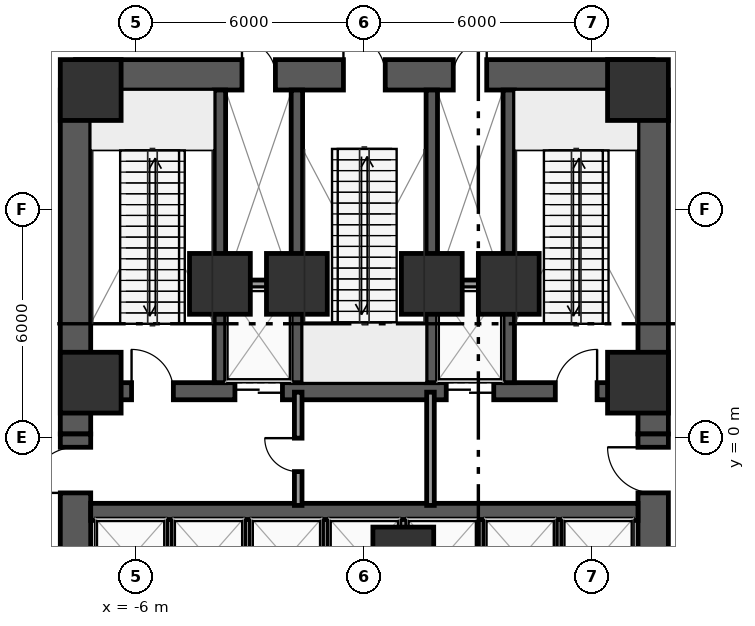
"""IFC4 building model, lengths in metres.
Left out: names, types, materials, properties, quantities, classifications, styles, units other than length and angle.
Written with IfcOpenShell. Run it as: python <this file> out.ifc"""

import sys

from ifc_helpers import new_model, si_unit, direction, frame, frame_2d, origin, origin_2d, place, context, subcontext, project, spatial, rectangle, extrude, element, fill, save


model = new_model("IFC4")
c1 = context("Model", 3, precision=1e-05, world=origin(), true_north=direction((0.0, 1.0)))
c2 = subcontext(c1, "Body", "Model", "MODEL_VIEW")
j1 = project(units=[si_unit("LENGTHUNIT", "METRE"), si_unit("PLANEANGLEUNIT", "RADIAN")], contexts=[c1])
p1 = place(None, origin())
s1 = spatial("IfcSite", under=j1, at=p1, CompositionType="ELEMENT")
p2 = place(p1, origin())
s2 = spatial("IfcBuilding", under=s1, at=p2, CompositionType="ELEMENT")
p3 = place(p2, origin())
s3 = spatial("IfcBuildingStorey", under=s2, at=p3, CompositionType="ELEMENT", Elevation=0.0)
p4 = place(p3, frame((-7.6, 9.55, 0.0), z_axis=(0.0, 0.0, 1.0), x_axis=(1.0, 0.0, 0.0)))
e1 = element("IfcWall", 1, at=p4, inside=s3, PredefinedType="SHEAR", context=c2, shape_type="SweptSolid", body=[
    extrude(rectangle(XDim=15.2, YDim=0.8, at=frame_2d((7.6, 0.0))), origin(), (0.0, 0.0, 1.0), 5.7),
])
p5 = place(p4, frame((7.05, 0.0, 0.0)))
e2 = element("IfcOpeningElement", 2, at=p5, cuts=e1, PredefinedType="OPENING", context=c2, shape_type="SweptSolid", body=[
    extrude(rectangle(XDim=1.1, YDim=2.15, at=frame_2d((0.55, 1.075))), frame((0.0, 0.41, 0.0), z_axis=(0.0, -1.0, 0.0), x_axis=(1.0, 0.0, 0.0)), (0.0, 0.0, 1.0), 0.82),
])
p6 = place(p4, frame((4.38, 0.0, 0.0)))
e3 = element("IfcOpeningElement", 3, at=p6, cuts=e1, PredefinedType="OPENING", context=c2, shape_type="SweptSolid", body=[
    extrude(rectangle(XDim=0.88, YDim=2.15, at=frame_2d((0.44, 1.075))), frame((0.0, 0.41, 0.0), z_axis=(0.0, -1.0, 0.0), x_axis=(1.0, 0.0, 0.0)), (0.0, 0.0, 1.0), 0.82),
])
p7 = place(p4, frame((9.94, 0.0, 0.0)))
e4 = element("IfcOpeningElement", 4, at=p7, cuts=e1, PredefinedType="OPENING", context=c2, shape_type="SweptSolid", body=[
    extrude(rectangle(XDim=0.88, YDim=2.15, at=frame_2d((0.44, 1.075))), frame((0.0, 0.41, 0.0), z_axis=(0.0, -1.0, 0.0), x_axis=(1.0, 0.0, 0.0)), (0.0, 0.0, 1.0), 0.82),
])
p8 = place(p3, frame((-7.2, 1.225, 0.0), z_axis=(0.0, 0.0, 1.0), x_axis=(1.0, 0.0, 0.0)))
e5 = element("IfcWall", 5, at=p8, inside=s3, PredefinedType="SHEAR", context=c2, shape_type="SweptSolid", body=[
    extrude(rectangle(XDim=14.4, YDim=0.45, at=frame_2d((7.2, 0.0))), origin(), (0.0, 0.0, 1.0), 5.7),
])
p9 = place(p8, frame((3.795, 0.0, 0.0)))
e6 = element("IfcOpeningElement", 6, at=p9, cuts=e5, PredefinedType="OPENING", context=c2, shape_type="SweptSolid", body=[
    extrude(rectangle(XDim=1.25, YDim=2.25, at=frame_2d((0.625, 1.125))), frame((0.0, 0.235, 0.0), z_axis=(0.0, -1.0, 0.0), x_axis=(1.0, 0.0, 0.0)), (0.0, 0.0, 1.0), 0.47),
])
p10 = place(p8, frame((9.355, 0.0, 0.0)))
e7 = element("IfcOpeningElement", 7, at=p10, cuts=e5, PredefinedType="OPENING", context=c2, shape_type="SweptSolid", body=[
    extrude(rectangle(XDim=1.25, YDim=2.25, at=frame_2d((0.625, 1.125))), frame((0.0, 0.235, 0.0), z_axis=(0.0, -1.0, 0.0), x_axis=(1.0, 0.0, 0.0)), (0.0, 0.0, 1.0), 0.47),
])
p11 = place(p8, frame((1.075, 0.0, 0.0)))
e8 = element("IfcOpeningElement", 8, at=p11, cuts=e5, PredefinedType="OPENING", context=c2, shape_type="SweptSolid", body=[
    extrude(rectangle(XDim=1.1, YDim=2.15, at=frame_2d((0.55, 1.075))), frame((0.0, 0.235, 0.0), z_axis=(0.0, -1.0, 0.0), x_axis=(1.0, 0.0, 0.0)), (0.0, 0.0, 1.0), 0.47),
])
p12 = place(p8, frame((12.225, 0.0, 0.0)))
e9 = element("IfcOpeningElement", 9, at=p12, cuts=e5, PredefinedType="OPENING", context=c2, shape_type="SweptSolid", body=[
    extrude(rectangle(XDim=1.1, YDim=2.15, at=frame_2d((0.55, 1.075))), frame((0.0, 0.235, 0.0), z_axis=(0.0, -1.0, 0.0), x_axis=(1.0, 0.0, 0.0)), (0.0, 0.0, 1.0), 0.47),
])
for number, where, z_axis, x_axis in (
    (10, (-3.8, 1.45, 0.0), (0.0, 0.0, 1.0), (0.0, 1.0, 0.0)),
    (11, (-1.775, 1.45, 0.0), (0.0, 0.0, 1.0), (0.0, 1.0, 0.0)),
    (12, (1.775, 1.45, 0.0), (0.0, 0.0, 1.0), (0.0, 1.0, 0.0)),
    (13, (3.8, 1.45, 0.0), (0.0, 0.0, 1.0), (0.0, 1.0, 0.0)),
):
    element("IfcWall", number, at=place(p3, frame(where, z_axis=z_axis, x_axis=x_axis)), inside=s3, PredefinedType="SHEAR", context=c2, shape_type="SweptSolid", body=[
        extrude(rectangle(XDim=7.7, YDim=0.3, at=frame_2d((3.85, 0.0))), origin(), (0.0, 0.0, 1.0), 5.7),
    ])
for number, where, z_axis, x_axis in (
    (14, (-7.6, 0.1, 0.0), (0.0, 0.0, 1.0), (0.0, 1.0, 0.0)),
    (15, (7.6, 0.1, 0.0), (0.0, 0.0, 1.0), (0.0, 1.0, 0.0)),
):
    element("IfcWall", number, at=place(p3, frame(where, z_axis=z_axis, x_axis=x_axis)), inside=s3, PredefinedType="SHEAR", context=c2, shape_type="SweptSolid", body=[
        extrude(rectangle(XDim=9.05, YDim=0.8, at=frame_2d((4.525, 0.0))), origin(), (0.0, 0.0, 1.0), 5.7),
    ])
p13 = place(p3, frame((-7.6, -8.85, 0.0), z_axis=(0.0, 0.0, 1.0), x_axis=(0.0, 1.0, 0.0)))
e16 = element("IfcWall", 16, at=p13, inside=s3, PredefinedType="SHEAR", context=c2, shape_type="SweptSolid", body=[
    extrude(rectangle(XDim=8.95, YDim=0.8, at=frame_2d((4.475, 0.0))), origin(), (0.0, 0.0, 1.0), 5.7),
])
p14 = place(p13, frame((2.49, 0.0, 0.0)))
e17 = element("IfcOpeningElement", 17, at=p14, cuts=e16, PredefinedType="OPENING", context=c2, shape_type="SweptSolid", body=[
    extrude(rectangle(XDim=1.8, YDim=2.2, at=frame_2d((0.9, 1.1))), frame((0.0, 0.41, 0.0), z_axis=(0.0, -1.0, 0.0), x_axis=(1.0, 0.0, 0.0)), (0.0, 0.0, 1.0), 0.82),
])
p15 = place(p13, frame((7.4, 0.0, 0.0)))
e18 = element("IfcOpeningElement", 18, at=p15, cuts=e16, PredefinedType="OPENING", context=c2, shape_type="SweptSolid", body=[
    extrude(rectangle(XDim=1.2, YDim=2.15, at=frame_2d((0.6, 1.075))), frame((0.0, 0.41, 0.0), z_axis=(0.0, -1.0, 0.0), x_axis=(1.0, 0.0, 0.0)), (0.0, 0.0, 1.0), 0.82),
])
p16 = place(p3, frame((7.6, -8.85, 0.0), z_axis=(0.0, 0.0, 1.0), x_axis=(0.0, 1.0, 0.0)))
e19 = element("IfcWall", 19, at=p16, inside=s3, PredefinedType="SHEAR", context=c2, shape_type="SweptSolid", body=[
    extrude(rectangle(XDim=8.95, YDim=0.8, at=frame_2d((4.475, 0.0))), origin(), (0.0, 0.0, 1.0), 5.7),
])
p17 = place(p16, frame((2.49, 0.0, 0.0)))
e20 = element("IfcOpeningElement", 20, at=p17, cuts=e19, PredefinedType="OPENING", context=c2, shape_type="SweptSolid", body=[
    extrude(rectangle(XDim=1.8, YDim=2.2, at=frame_2d((0.9, 1.1))), frame((0.0, 0.41, 0.0), z_axis=(0.0, -1.0, 0.0), x_axis=(1.0, 0.0, 0.0)), (0.0, 0.0, 1.0), 0.82),
])
p18 = place(p16, frame((7.4, 0.0, 0.0)))
e21 = element("IfcOpeningElement", 21, at=p18, cuts=e19, PredefinedType="OPENING", context=c2, shape_type="SweptSolid", body=[
    extrude(rectangle(XDim=1.2, YDim=2.15, at=frame_2d((0.6, 1.075))), frame((0.0, 0.41, 0.0), z_axis=(0.0, -1.0, 0.0), x_axis=(1.0, 0.0, 0.0)), (0.0, 0.0, 1.0), 0.82),
])
p19 = place(p3, frame((-7.2, -1.95, 0.0), z_axis=(0.0, 0.0, 1.0), x_axis=(1.0, 0.0, 0.0)))
e22 = element("IfcWall", 22, at=p19, inside=s3, PredefinedType="SHEAR", context=c2, shape_type="SweptSolid", body=[
    extrude(rectangle(XDim=14.4, YDim=0.45, at=frame_2d((7.2, 0.0))), origin(), (0.0, 0.0, 1.0), 5.7),
])
for number, where, z_axis, x_axis in (
    (23, (7.2, 1.45, 0.0), (0.0, 0.0, 1.0), (1.0, 0.0, 0.0)),
    (24, (7.2, 9.15, 0.0), (0.0, 0.0, 1.0), (1.0, 0.0, 0.0)),
    (25, (-7.2, 9.15, 0.0), (0.0, 0.0, 1.0), (1.0, 0.0, 0.0)),
    (26, (-7.2, 1.45, 0.0), (0.0, 0.0, 1.0), (1.0, 0.0, 0.0)),
    (27, (-3.8, 4.05, 0.0), (0.0, 0.0, 1.0), (1.0, 0.0, 0.0)),
    (28, (3.8, 4.05, 0.0), (0.0, 0.0, 1.0), (1.0, 0.0, 0.0)),
    (29, (-1.775, 4.05, 0.0), (0.0, 0.0, 1.0), (1.0, 0.0, 0.0)),
    (30, (1.775, 4.05, 0.0), (0.0, 0.0, 1.0), (1.0, 0.0, 0.0)),
    (31, (1.025, -3.15, 0.0), (0.0, 0.0, 1.0), (1.0, 0.0, 0.0)),
):
    element("IfcColumn", number, at=place(p3, frame(where, z_axis=z_axis, x_axis=x_axis)), inside=s3, PredefinedType="COLUMN", context=c2, shape_type="SweptSolid", body=[
        extrude(rectangle(XDim=1.6, YDim=1.6, at=origin_2d()), origin(), (0.0, 0.0, 1.0), 6.0),
    ])
for number, where, z_axis, x_axis in (
    (32, (-3.65, 4.05, 0.0), (0.0, 0.0, 1.0), (1.0, 0.0, 0.0)),
    (33, (1.92, 4.05, 0.0), (0.0, 0.0, 1.0), (1.0, 0.0, 0.0)),
):
    element("IfcWall", number, at=place(p3, frame(where, z_axis=z_axis, x_axis=x_axis)), inside=s3, PredefinedType="PARTITIONING", context=c2, shape_type="SweptSolid", body=[
        extrude(rectangle(XDim=1.73, YDim=0.2, at=frame_2d((0.865, 0.0))), origin(), (0.0, 0.0, 1.0), 5.7),
    ])
for number, where, z_axis, x_axis in (
    (34, (-5.125, -4.18, 0.0), (0.0, 0.0, 1.0), (0.0, 1.0, 0.0)),
    (35, (-3.075, -4.18, 0.0), (0.0, 0.0, 1.0), (0.0, 1.0, 0.0)),
    (36, (-1.025, -4.18, 0.0), (0.0, 0.0, 1.0), (0.0, 1.0, 0.0)),
):
    element("IfcWall", number, at=place(p3, frame(where, z_axis=z_axis, x_axis=x_axis)), inside=s3, PredefinedType="PARTITIONING", context=c2, shape_type="SweptSolid", body=[
        extrude(rectangle(XDim=2.03, YDim=0.15, at=frame_2d((1.015, 0.0))), origin(), (0.0, 0.0, 1.0), 5.7),
    ])
p20 = place(p3, frame((1.025, -4.18, 0.0), z_axis=(0.0, 0.0, 1.0), x_axis=(0.0, 1.0, 0.0)))
e37 = element("IfcWall", 37, at=p20, inside=s3, PredefinedType="PARTITIONING", context=c2, shape_type="SweptSolid", body=[
    extrude(rectangle(XDim=2.03, YDim=0.18, at=frame_2d((1.015, 0.0))), origin(), (0.0, 0.0, 1.0), 4.748),
])
for number, where, z_axis, x_axis in (
    (38, (3.075, -4.18, 0.0), (0.0, 0.0, 1.0), (0.0, 1.0, 0.0)),
    (39, (5.125, -4.18, 0.0), (0.0, 0.0, 1.0), (0.0, 1.0, 0.0)),
):
    element("IfcWall", number, at=place(p3, frame(where, z_axis=z_axis, x_axis=x_axis)), inside=s3, PredefinedType="PARTITIONING", context=c2, shape_type="SweptSolid", body=[
        extrude(rectangle(XDim=2.03, YDim=0.15, at=frame_2d((1.015, 0.0))), origin(), (0.0, 0.0, 1.0), 5.7),
    ])
p21 = place(p3, frame((-1.74, -1.78, 0.0), z_axis=(0.0, 0.0, 1.0), x_axis=(0.0, 1.0, 0.0)))
e40 = element("IfcWall", 40, at=p21, inside=s3, PredefinedType="PARTITIONING", context=c2, shape_type="SweptSolid", body=[
    extrude(rectangle(XDim=2.98, YDim=0.2, at=frame_2d((1.49, 0.0))), origin(), (0.0, 0.0, 1.0), 5.7),
])
p22 = place(p21, frame((0.89, 0.0, 0.0)))
e41 = element("IfcOpeningElement", 41, at=p22, cuts=e40, PredefinedType="OPENING", context=c2, shape_type="SweptSolid", body=[
    extrude(rectangle(XDim=0.88, YDim=2.15, at=frame_2d((0.44, 1.075))), frame((0.0, 0.11, 0.0), z_axis=(0.0, -1.0, 0.0), x_axis=(1.0, 0.0, 0.0)), (0.0, 0.0, 1.0), 0.22),
])
p23 = place(p3, frame((1.74, -1.78, 0.0), z_axis=(0.0, 0.0, 1.0), x_axis=(0.0, 1.0, 0.0)))
e42 = element("IfcWall", 42, at=p23, inside=s3, PredefinedType="PARTITIONING", context=c2, shape_type="SweptSolid", body=[
    extrude(rectangle(XDim=2.98, YDim=0.2, at=frame_2d((1.49, 0.0))), origin(), (0.0, 0.0, 1.0), 5.7),
])
p24 = place(p9, origin())
e43 = element("IfcDoor", 43, at=p24, inside=s3, OperationType="DOUBLE_DOOR_SLIDING", PredefinedType="DOOR", context=c2, shape_type="SweptSolid", body=[
    extrude(rectangle(XDim=1.25, YDim=2.25, at=frame_2d((0.625, 1.125))), frame((0.0, 0.025, 0.0), z_axis=(0.0, -1.0, 0.0), x_axis=(1.0, 0.0, 0.0)), (0.0, 0.0, 1.0), 0.05),
])
fill(e6, e43)
p25 = place(p10, origin())
e44 = element("IfcDoor", 44, at=p25, inside=s3, OperationType="DOUBLE_DOOR_SLIDING", PredefinedType="DOOR", context=c2, shape_type="SweptSolid", body=[
    extrude(rectangle(XDim=1.25, YDim=2.25, at=frame_2d((0.625, 1.125))), frame((0.0, 0.025, 0.0), z_axis=(0.0, -1.0, 0.0), x_axis=(1.0, 0.0, 0.0)), (0.0, 0.0, 1.0), 0.05),
])
fill(e7, e44)
p26 = place(p11, origin())
e45 = element("IfcDoor", 45, at=p26, inside=s3, OperationType="SINGLE_SWING_LEFT", PredefinedType="DOOR", context=c2, shape_type="SweptSolid", body=[
    extrude(rectangle(XDim=1.1, YDim=2.15, at=frame_2d((0.55, 1.075))), frame((0.0, 0.025, 0.0), z_axis=(0.0, -1.0, 0.0), x_axis=(1.0, 0.0, 0.0)), (0.0, 0.0, 1.0), 0.05),
])
fill(e8, e45)
p27 = place(p12, origin())
e46 = element("IfcDoor", 46, at=p27, inside=s3, OperationType="SINGLE_SWING_RIGHT", PredefinedType="DOOR", context=c2, shape_type="SweptSolid", body=[
    extrude(rectangle(XDim=1.1, YDim=2.15, at=frame_2d((0.55, 1.075))), frame((0.0, 0.025, 0.0), z_axis=(0.0, -1.0, 0.0), x_axis=(1.0, 0.0, 0.0)), (0.0, 0.0, 1.0), 0.05),
])
fill(e9, e46)
p28 = place(p5, origin())
e47 = element("IfcDoor", 47, at=p28, inside=s3, OperationType="SINGLE_SWING_LEFT", PredefinedType="DOOR", context=c2, shape_type="SweptSolid", body=[
    extrude(rectangle(XDim=1.1, YDim=2.15, at=frame_2d((0.55, 1.075))), frame((0.0, 0.025, 0.0), z_axis=(0.0, -1.0, 0.0), x_axis=(1.0, 0.0, 0.0)), (0.0, 0.0, 1.0), 0.05),
])
fill(e2, e47)
p29 = place(p6, origin())
e48 = element("IfcDoor", 48, at=p29, inside=s3, OperationType="SINGLE_SWING_LEFT", PredefinedType="DOOR", context=c2, shape_type="SweptSolid", body=[
    extrude(rectangle(XDim=0.88, YDim=2.15, at=frame_2d((0.44, 1.075))), frame((0.0, 0.025, 0.0), z_axis=(0.0, -1.0, 0.0), x_axis=(1.0, 0.0, 0.0)), (0.0, 0.0, 1.0), 0.05),
])
fill(e3, e48)
p30 = place(p7, origin())
e49 = element("IfcDoor", 49, at=p30, inside=s3, OperationType="SINGLE_SWING_RIGHT", PredefinedType="DOOR", context=c2, shape_type="SweptSolid", body=[
    extrude(rectangle(XDim=0.88, YDim=2.15, at=frame_2d((0.44, 1.075))), frame((0.0, 0.025, 0.0), z_axis=(0.0, -1.0, 0.0), x_axis=(1.0, 0.0, 0.0)), (0.0, 0.0, 1.0), 0.05),
])
fill(e4, e49)
p31 = place(p15, origin())
e50 = element("IfcDoor", 50, at=p31, inside=s3, OperationType="SINGLE_SWING_LEFT", PredefinedType="DOOR", context=c2, shape_type="SweptSolid", body=[
    extrude(rectangle(XDim=1.2, YDim=2.15, at=frame_2d((0.6, 1.075))), frame((0.0, 0.025, 0.0), z_axis=(0.0, -1.0, 0.0), x_axis=(1.0, 0.0, 0.0)), (0.0, 0.0, 1.0), 0.05),
])
fill(e18, e50)
p32 = place(p18, origin())
e51 = element("IfcDoor", 51, at=p32, inside=s3, OperationType="SINGLE_SWING_RIGHT", PredefinedType="DOOR", context=c2, shape_type="SweptSolid", body=[
    extrude(rectangle(XDim=1.2, YDim=2.15, at=frame_2d((0.6, 1.075))), frame((0.0, 0.025, 0.0), z_axis=(0.0, -1.0, 0.0), x_axis=(1.0, 0.0, 0.0)), (0.0, 0.0, 1.0), 0.05),
])
fill(e21, e51)
p33 = place(p22, origin())
e52 = element("IfcDoor", 52, at=p33, inside=s3, OperationType="SINGLE_SWING_RIGHT", PredefinedType="DOOR", context=c2, shape_type="SweptSolid", body=[
    extrude(rectangle(XDim=0.88, YDim=2.15, at=frame_2d((0.44, 1.075))), frame((0.0, 0.025, 0.0), z_axis=(0.0, -1.0, 0.0), x_axis=(1.0, 0.0, 0.0)), (0.0, 0.0, 1.0), 0.05),
])
fill(e41, e52)
save(model, sys.argv[1])
